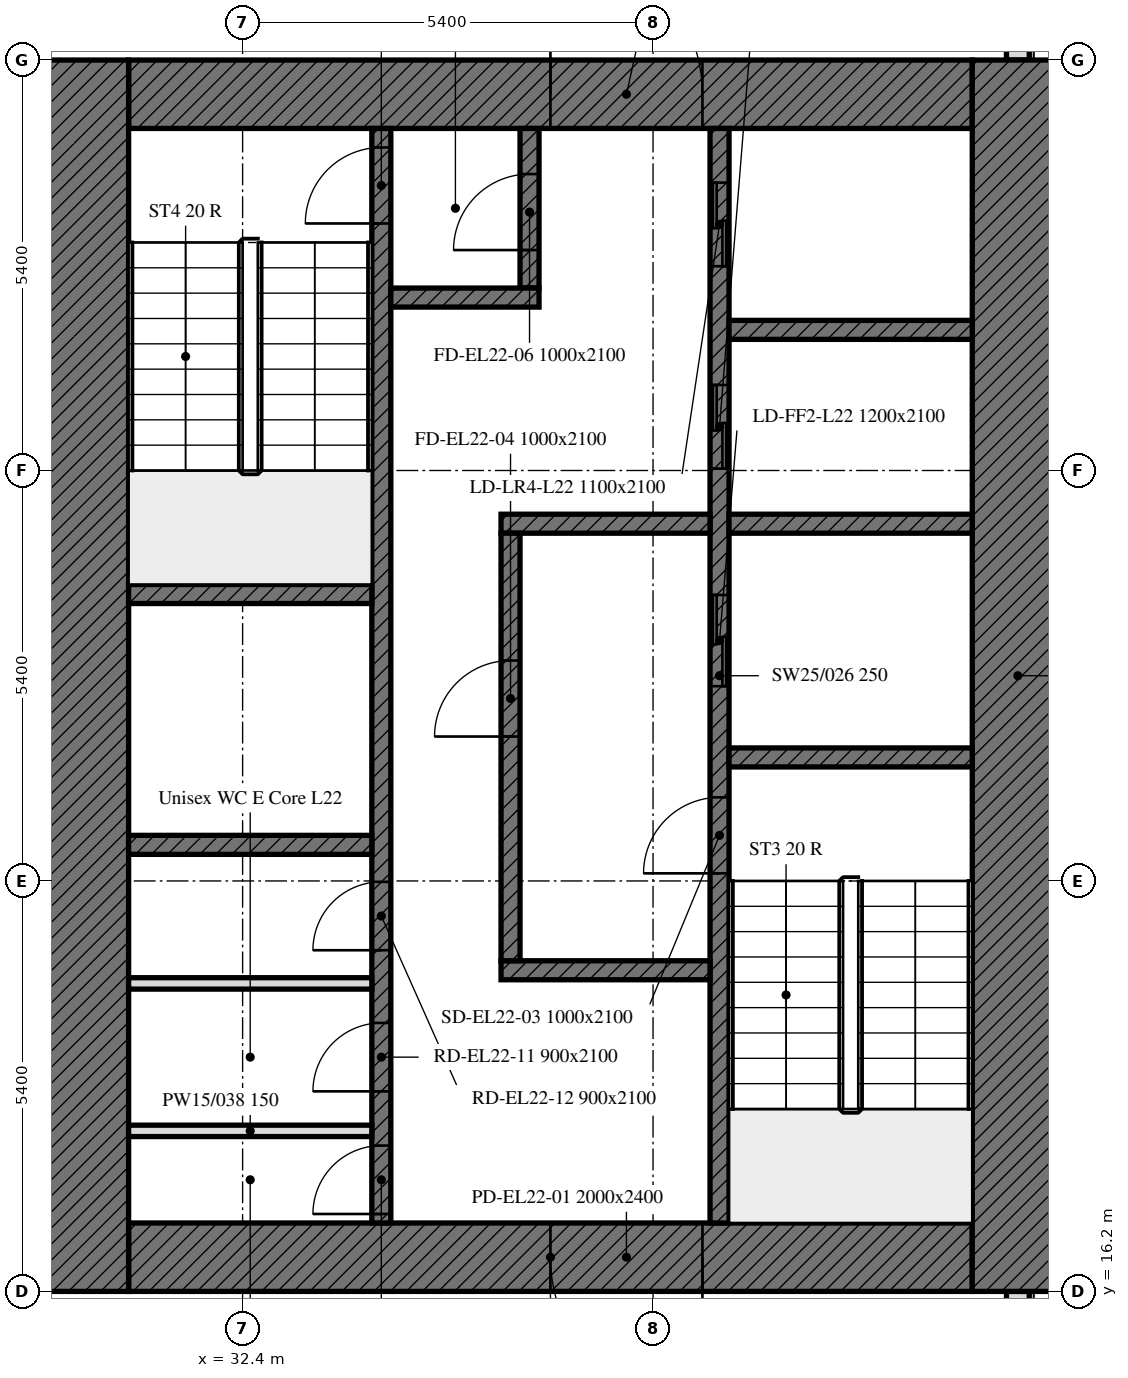
"""IFC4 building model, lengths in metres.
Left out: names, types, materials, properties, quantities, classifications, styles, units other than length and angle.
Written with IfcOpenShell. Run it as: python <this file> out.ifc"""

import sys

from ifc_helpers import new_model, si_unit, direction, frame, frame_2d, origin, place, context, subcontext, project, spatial, rectangle, extrude, element, fill, save


model = new_model("IFC4")
c1 = context("Model", 3, precision=1e-05, world=origin(), true_north=direction((0.0, 1.0)))
c2 = subcontext(c1, "Body", "Model", "MODEL_VIEW")
j1 = project(units=[si_unit("LENGTHUNIT", "METRE"), si_unit("PLANEANGLEUNIT", "RADIAN")], contexts=[c1])
p1 = place(None, origin())
s1 = spatial("IfcSite", under=j1, at=p1, CompositionType="ELEMENT")
p2 = place(p1, origin())
s2 = spatial("IfcBuilding", under=s1, at=p2, CompositionType="ELEMENT")
p3 = place(p2, frame((0.0, 0.0, 95.4)))
s3 = spatial("IfcBuildingStorey", under=s2, at=p3, CompositionType="ELEMENT", Elevation=95.4)
p4 = place(p3, frame((42.6, 10.986, 0.0), z_axis=(0.0, 0.0, 1.0), x_axis=(0.0, 1.0, 0.0)))
e1 = element("IfcWall", 1, at=p4, inside=s3, PredefinedType="SOLIDWALL", context=c2, shape_type="SweptSolid", body=[
    extrude(rectangle(XDim=5.214, YDim=0.3, at=frame_2d((2.607, 0.0))), origin(), (0.0, 0.0, 1.0), 3.5),
])
p5 = place(p4, frame((0.714, 0.0, 0.0)))
e2 = element("IfcOpeningElement", 2, at=p5, cuts=e1, PredefinedType="OPENING", context=c2, shape_type="SweptSolid", body=[
    extrude(rectangle(XDim=1.2, YDim=2.4, at=frame_2d((0.6, 1.2))), frame((0.0, 0.16, 0.0), z_axis=(0.0, -1.0, 0.0), x_axis=(1.0, 0.0, 0.0)), (0.0, 0.0, 1.0), 0.32),
])
p6 = place(p3, frame((42.6, 32.4, 0.0), z_axis=(0.0, 0.0, 1.0), x_axis=(0.0, 1.0, 0.0)))
e3 = element("IfcWall", 3, at=p6, inside=s3, PredefinedType="SOLIDWALL", context=c2, shape_type="SweptSolid", body=[
    extrude(rectangle(XDim=10.614, YDim=0.3, at=frame_2d((5.307, 0.0))), origin(), (0.0, 0.0, 1.0), 3.5),
])
p7 = place(p6, frame((3.3, 0.0, 0.0)))
e4 = element("IfcOpeningElement", 4, at=p7, cuts=e3, PredefinedType="OPENING", context=c2, shape_type="SweptSolid", body=[
    extrude(rectangle(XDim=1.2, YDim=2.4, at=frame_2d((0.6, 1.2))), frame((0.0, 0.16, 0.0), z_axis=(0.0, -1.0, 0.0), x_axis=(1.0, 0.0, 0.0)), (0.0, 0.0, 1.0), 0.32),
])
p8 = place(p6, frame((7.2, 0.0, 0.0)))
e5 = element("IfcOpeningElement", 5, at=p8, cuts=e3, PredefinedType="OPENING", context=c2, shape_type="SweptSolid", body=[
    extrude(rectangle(XDim=1.8, YDim=2.4, at=frame_2d((0.9, 1.2))), frame((0.0, 0.16, 0.0), z_axis=(0.0, -1.0, 0.0), x_axis=(1.0, 0.0, 0.0)), (0.0, 0.0, 1.0), 0.32),
])
p9 = place(p3, frame((42.0, 16.65, 0.0), z_axis=(0.0, 0.0, 1.0), x_axis=(-1.0, 0.0, 0.0)))
e6 = element("IfcWall", 6, at=p9, inside=s3, PredefinedType="SOLIDWALL", context=c2, shape_type="SweptSolid", body=[
    extrude(rectangle(XDim=11.1, YDim=0.9, at=frame_2d((5.55, 0.0))), origin(), (0.0, 0.0, 1.0), 3.5),
])
p10 = place(p9, frame((3.55, 0.0, 0.0)))
e7 = element("IfcOpeningElement", 7, at=p10, cuts=e6, PredefinedType="OPENING", context=c2, shape_type="SweptSolid", body=[
    extrude(rectangle(XDim=2.0, YDim=2.4, at=frame_2d((1.0, 1.2))), frame((0.0, 0.45, 0.0), z_axis=(0.0, -1.0, 0.0), x_axis=(1.0, 0.0, 0.0)), (0.0, 0.0, 1.0), 0.9),
])
p11 = place(p3, frame((30.9, 31.95, 0.0), z_axis=(0.0, 0.0, 1.0), x_axis=(1.0, 0.0, 0.0)))
e8 = element("IfcWall", 8, at=p11, inside=s3, PredefinedType="SOLIDWALL", context=c2, shape_type="SweptSolid", body=[
    extrude(rectangle(XDim=11.1, YDim=0.9, at=frame_2d((5.55, 0.0))), origin(), (0.0, 0.0, 1.0), 3.5),
])
p12 = place(p11, frame((5.55, 0.0, 0.0)))
e9 = element("IfcOpeningElement", 9, at=p12, cuts=e8, PredefinedType="OPENING", context=c2, shape_type="SweptSolid", body=[
    extrude(rectangle(XDim=2.0, YDim=2.4, at=frame_2d((1.0, 1.2))), frame((0.0, 0.45, 0.0), z_axis=(0.0, -1.0, 0.0), x_axis=(1.0, 0.0, 0.0)), (0.0, 0.0, 1.0), 0.9),
])
for number, where, z_axis, x_axis in (
    (10, (42.6, 32.4, 0.0), (0.0, 0.0, 1.0), (0.0, -1.0, 0.0)),
    (11, (30.3, 16.2, 0.0), (0.0, 0.0, 1.0), (0.0, 1.0, 0.0)),
):
    element("IfcWall", number, at=place(p3, frame(where, z_axis=z_axis, x_axis=x_axis)), inside=s3, PredefinedType="SOLIDWALL", context=c2, shape_type="SweptSolid", body=[
        extrude(rectangle(XDim=16.2, YDim=1.2, at=frame_2d((8.1, 0.0))), origin(), (0.0, 0.0, 1.0), 3.5),
    ])
p13 = place(p3, frame((38.675, 17.1, 0.0), z_axis=(0.0, 0.0, 1.0), x_axis=(0.0, 1.0, 0.0)))
e12 = element("IfcWall", 12, at=p13, inside=s3, PredefinedType="SOLIDWALL", context=c2, shape_type="SweptSolid", body=[
    extrude(rectangle(XDim=14.4, YDim=0.25, at=frame_2d((7.2, 0.0))), origin(), (0.0, 0.0, 1.0), 3.5),
])
p14 = place(p13, frame((4.6, 0.0, 0.0)))
e13 = element("IfcOpeningElement", 13, at=p14, cuts=e12, PredefinedType="OPENING", context=c2, shape_type="SweptSolid", body=[
    extrude(rectangle(XDim=1.0, YDim=2.1, at=frame_2d((0.5, 1.05))), frame((0.0, 0.125, 0.0), z_axis=(0.0, -1.0, 0.0), x_axis=(1.0, 0.0, 0.0)), (0.0, 0.0, 1.0), 0.25),
])
p15 = place(p13, frame((7.062, 0.0, 0.0)))
e14 = element("IfcOpeningElement", 14, at=p15, cuts=e12, PredefinedType="OPENING", context=c2, shape_type="SweptSolid", body=[
    extrude(rectangle(XDim=1.2, YDim=2.1, at=frame_2d((0.6, 1.05))), frame((0.0, 0.125, 0.0), z_axis=(0.0, -1.0, 0.0), x_axis=(1.0, 0.0, 0.0)), (0.0, 0.0, 1.0), 0.25),
])
p16 = place(p13, frame((9.925, 0.0, 0.0)))
e15 = element("IfcOpeningElement", 15, at=p16, cuts=e12, PredefinedType="OPENING", context=c2, shape_type="SweptSolid", body=[
    extrude(rectangle(XDim=1.1, YDim=2.1, at=frame_2d((0.55, 1.05))), frame((0.0, 0.125, 0.0), z_axis=(0.0, -1.0, 0.0), x_axis=(1.0, 0.0, 0.0)), (0.0, 0.0, 1.0), 0.25),
])
p17 = place(p13, frame((12.587, 0.0, 0.0)))
e16 = element("IfcOpeningElement", 16, at=p17, cuts=e12, PredefinedType="OPENING", context=c2, shape_type="SweptSolid", body=[
    extrude(rectangle(XDim=1.1, YDim=2.1, at=frame_2d((0.55, 1.05))), frame((0.0, 0.125, 0.0), z_axis=(0.0, -1.0, 0.0), x_axis=(1.0, 0.0, 0.0)), (0.0, 0.0, 1.0), 0.25),
])
p18 = place(p3, frame((34.225, 17.1, 0.0), z_axis=(0.0, 0.0, 1.0), x_axis=(0.0, 1.0, 0.0)))
e17 = element("IfcWall", 17, at=p18, inside=s3, PredefinedType="SOLIDWALL", context=c2, shape_type="SweptSolid", body=[
    extrude(rectangle(XDim=14.4, YDim=0.25, at=frame_2d((7.2, 0.0))), origin(), (0.0, 0.0, 1.0), 3.5),
])
p19 = place(p18, frame((13.15, 0.0, 0.0)))
e18 = element("IfcOpeningElement", 18, at=p19, cuts=e17, PredefinedType="OPENING", context=c2, shape_type="SweptSolid", body=[
    extrude(rectangle(XDim=1.0, YDim=2.1, at=frame_2d((0.5, 1.05))), frame((0.0, 0.125, 0.0), z_axis=(0.0, -1.0, 0.0), x_axis=(1.0, 0.0, 0.0)), (0.0, 0.0, 1.0), 0.25),
])
p20 = place(p18, frame((0.118, 0.0, 0.0)))
e19 = element("IfcOpeningElement", 19, at=p20, cuts=e17, PredefinedType="OPENING", context=c2, shape_type="SweptSolid", body=[
    extrude(rectangle(XDim=0.9, YDim=2.1, at=frame_2d((0.45, 1.05))), frame((0.0, 0.125, 0.0), z_axis=(0.0, -1.0, 0.0), x_axis=(1.0, 0.0, 0.0)), (0.0, 0.0, 1.0), 0.25),
])
p21 = place(p18, frame((1.732, 0.0, 0.0)))
e20 = element("IfcOpeningElement", 20, at=p21, cuts=e17, PredefinedType="OPENING", context=c2, shape_type="SweptSolid", body=[
    extrude(rectangle(XDim=0.9, YDim=2.1, at=frame_2d((0.45, 1.05))), frame((0.0, 0.125, 0.0), z_axis=(0.0, -1.0, 0.0), x_axis=(1.0, 0.0, 0.0)), (0.0, 0.0, 1.0), 0.25),
])
p22 = place(p18, frame((3.588, 0.0, 0.0)))
e21 = element("IfcOpeningElement", 21, at=p22, cuts=e17, PredefinedType="OPENING", context=c2, shape_type="SweptSolid", body=[
    extrude(rectangle(XDim=0.9, YDim=2.1, at=frame_2d((0.45, 1.05))), frame((0.0, 0.125, 0.0), z_axis=(0.0, -1.0, 0.0), x_axis=(1.0, 0.0, 0.0)), (0.0, 0.0, 1.0), 0.25),
])
p23 = place(p3, frame((38.8, 23.225, 0.0), z_axis=(0.0, 0.0, 1.0), x_axis=(1.0, 0.0, 0.0)))
e22 = element("IfcWall", 22, at=p23, inside=s3, PredefinedType="SOLIDWALL", context=c2, shape_type="SweptSolid", body=[
    extrude(rectangle(XDim=3.2, YDim=0.25, at=frame_2d((1.6, 0.0))), origin(), (0.0, 0.0, 1.0), 3.5),
])
for number, where, z_axis, x_axis in (
    (23, (30.9, 25.375, 0.0), (0.0, 0.0, 1.0), (1.0, 0.0, 0.0)),
    (24, (30.9, 22.075, 0.0), (0.0, 0.0, 1.0), (1.0, 0.0, 0.0)),
):
    element("IfcWall", number, at=place(p3, frame(where, z_axis=z_axis, x_axis=x_axis)), inside=s3, PredefinedType="SOLIDWALL", context=c2, shape_type="SweptSolid", body=[
        extrude(rectangle(XDim=3.2, YDim=0.25, at=frame_2d((1.6, 0.0))), origin(), (0.0, 0.0, 1.0), 3.5),
    ])
p24 = place(p3, frame((38.8, 26.3, 0.0), z_axis=(0.0, 0.0, 1.0), x_axis=(1.0, 0.0, 0.0)))
e25 = element("IfcWall", 25, at=p24, inside=s3, PredefinedType="SOLIDWALL", context=c2, shape_type="SweptSolid", body=[
    extrude(rectangle(XDim=3.2, YDim=0.25, at=frame_2d((1.6, 0.0))), origin(), (0.0, 0.0, 1.0), 3.5),
])
for number, where, z_axis, x_axis in (
    (26, (35.8, 26.3, 0.0), (0.0, 0.0, 1.0), (1.0, 0.0, 0.0)),
    (27, (35.8, 20.425, 0.0), (0.0, 0.0, 1.0), (1.0, 0.0, 0.0)),
):
    element("IfcWall", number, at=place(p3, frame(where, z_axis=z_axis, x_axis=x_axis)), inside=s3, PredefinedType="SOLIDWALL", context=c2, shape_type="SweptSolid", body=[
        extrude(rectangle(XDim=2.75, YDim=0.25, at=frame_2d((1.375, 0.0))), origin(), (0.0, 0.0, 1.0), 3.5),
    ])
p25 = place(p3, frame((36.175, 29.4, 0.0), z_axis=(0.0, 0.0, 1.0), x_axis=(0.0, 1.0, 0.0)))
e28 = element("IfcWall", 28, at=p25, inside=s3, PredefinedType="SOLIDWALL", context=c2, shape_type="SweptSolid", body=[
    extrude(rectangle(XDim=2.1, YDim=0.25, at=frame_2d((1.05, 0.0))), origin(), (0.0, 0.0, 1.0), 3.5),
])
p26 = place(p25, frame((0.5, 0.0, 0.0)))
e29 = element("IfcOpeningElement", 29, at=p26, cuts=e28, PredefinedType="OPENING", context=c2, shape_type="SweptSolid", body=[
    extrude(rectangle(XDim=1.0, YDim=2.1, at=frame_2d((0.5, 1.05))), frame((0.0, 0.125, 0.0), z_axis=(0.0, -1.0, 0.0), x_axis=(1.0, 0.0, 0.0)), (0.0, 0.0, 1.0), 0.25),
])
p27 = place(p3, frame((34.35, 29.275, 0.0), z_axis=(0.0, 0.0, 1.0), x_axis=(1.0, 0.0, 0.0)))
e30 = element("IfcWall", 30, at=p27, inside=s3, PredefinedType="SOLIDWALL", context=c2, shape_type="SweptSolid", body=[
    extrude(rectangle(XDim=1.95, YDim=0.25, at=frame_2d((0.975, 0.0))), origin(), (0.0, 0.0, 1.0), 3.5),
])
p28 = place(p3, frame((35.925, 20.55, 0.0), z_axis=(0.0, 0.0, 1.0), x_axis=(0.0, 1.0, 0.0)))
e31 = element("IfcWall", 31, at=p28, inside=s3, PredefinedType="SOLIDWALL", context=c2, shape_type="SweptSolid", body=[
    extrude(rectangle(XDim=5.625, YDim=0.25, at=frame_2d((2.812, 0.0))), origin(), (0.0, 0.0, 1.0), 3.5),
])
p29 = place(p28, frame((2.95, 0.0, 0.0)))
e32 = element("IfcOpeningElement", 32, at=p29, cuts=e31, PredefinedType="OPENING", context=c2, shape_type="SweptSolid", body=[
    extrude(rectangle(XDim=1.0, YDim=2.1, at=frame_2d((0.5, 1.05))), frame((0.0, 0.125, 0.0), z_axis=(0.0, -1.0, 0.0), x_axis=(1.0, 0.0, 0.0)), (0.0, 0.0, 1.0), 0.25),
])
p30 = place(p3, frame((38.8, 28.85, 0.0), z_axis=(0.0, 0.0, 1.0), x_axis=(1.0, 0.0, 0.0)))
e33 = element("IfcWall", 33, at=p30, inside=s3, PredefinedType="SOLIDWALL", context=c2, shape_type="SweptSolid", body=[
    extrude(rectangle(XDim=3.2, YDim=0.25, at=frame_2d((1.6, 0.0))), origin(), (0.0, 0.0, 1.0), 3.5),
])
for number, where, z_axis, x_axis in (
    (34, (30.9, 18.312, 0.0), (0.0, 0.0, 1.0), (1.0, 0.0, 0.0)),
    (35, (30.9, 20.252, 0.0), (0.0, 0.0, 1.0), (1.0, 0.0, 0.0)),
):
    element("IfcWall", number, at=place(p3, frame(where, z_axis=z_axis, x_axis=x_axis)), inside=s3, PredefinedType="PARTITIONING", context=c2, shape_type="SweptSolid", body=[
        extrude(rectangle(XDim=3.2, YDim=0.15, at=frame_2d((1.6, 0.0))), origin(), (0.0, 0.0, 1.0), 3.5),
    ])
p31 = place(p10, origin())
e36 = element("IfcDoor", 36, at=p31, inside=s3, OperationType="DOUBLE_DOOR_SINGLE_SWING", PredefinedType="DOOR", context=c2, shape_type="SweptSolid", body=[
    extrude(rectangle(XDim=2.0, YDim=2.4, at=frame_2d((1.0, 1.2))), frame((0.0, 0.025, 0.0), z_axis=(0.0, -1.0, 0.0), x_axis=(1.0, 0.0, 0.0)), (0.0, 0.0, 1.0), 0.05),
])
fill(e7, e36)
p32 = place(p12, origin())
e37 = element("IfcDoor", 37, at=p32, inside=s3, OperationType="DOUBLE_DOOR_SINGLE_SWING", PredefinedType="DOOR", context=c2, shape_type="SweptSolid", body=[
    extrude(rectangle(XDim=2.0, YDim=2.4, at=frame_2d((1.0, 1.2))), frame((0.0, 0.025, 0.0), z_axis=(0.0, -1.0, 0.0), x_axis=(1.0, 0.0, 0.0)), (0.0, 0.0, 1.0), 0.05),
])
fill(e9, e37)
p33 = place(p14, origin())
e38 = element("IfcDoor", 38, at=p33, inside=s3, OperationType="SINGLE_SWING_LEFT", PredefinedType="DOOR", context=c2, shape_type="SweptSolid", body=[
    extrude(rectangle(XDim=1.0, YDim=2.1, at=frame_2d((0.5, 1.05))), frame((0.0, 0.025, 0.0), z_axis=(0.0, -1.0, 0.0), x_axis=(1.0, 0.0, 0.0)), (0.0, 0.0, 1.0), 0.05),
])
fill(e13, e38)
p34 = place(p29, origin())
e39 = element("IfcDoor", 39, at=p34, inside=s3, OperationType="SINGLE_SWING_LEFT", PredefinedType="DOOR", context=c2, shape_type="SweptSolid", body=[
    extrude(rectangle(XDim=1.0, YDim=2.1, at=frame_2d((0.5, 1.05))), frame((0.0, 0.025, 0.0), z_axis=(0.0, -1.0, 0.0), x_axis=(1.0, 0.0, 0.0)), (0.0, 0.0, 1.0), 0.05),
])
fill(e32, e39)
p35 = place(p19, origin())
e40 = element("IfcDoor", 40, at=p35, inside=s3, OperationType="SINGLE_SWING_LEFT", PredefinedType="DOOR", context=c2, shape_type="SweptSolid", body=[
    extrude(rectangle(XDim=1.0, YDim=2.1, at=frame_2d((0.5, 1.05))), frame((0.0, 0.025, 0.0), z_axis=(0.0, -1.0, 0.0), x_axis=(1.0, 0.0, 0.0)), (0.0, 0.0, 1.0), 0.05),
])
fill(e18, e40)
p36 = place(p26, origin())
e41 = element("IfcDoor", 41, at=p36, inside=s3, OperationType="SINGLE_SWING_LEFT", PredefinedType="DOOR", context=c2, shape_type="SweptSolid", body=[
    extrude(rectangle(XDim=1.0, YDim=2.1, at=frame_2d((0.5, 1.05))), frame((0.0, 0.025, 0.0), z_axis=(0.0, -1.0, 0.0), x_axis=(1.0, 0.0, 0.0)), (0.0, 0.0, 1.0), 0.05),
])
fill(e29, e41)
p37 = place(p15, origin())
e42 = element("IfcDoor", 42, at=p37, inside=s3, OperationType="DOUBLE_DOOR_SLIDING", PredefinedType="DOOR", context=c2, shape_type="SweptSolid", body=[
    extrude(rectangle(XDim=1.2, YDim=2.1, at=frame_2d((0.6, 1.05))), frame((0.0, 0.025, 0.0), z_axis=(0.0, -1.0, 0.0), x_axis=(1.0, 0.0, 0.0)), (0.0, 0.0, 1.0), 0.05),
])
fill(e14, e42)
p38 = place(p16, origin())
e43 = element("IfcDoor", 43, at=p38, inside=s3, OperationType="DOUBLE_DOOR_SLIDING", PredefinedType="DOOR", context=c2, shape_type="SweptSolid", body=[
    extrude(rectangle(XDim=1.1, YDim=2.1, at=frame_2d((0.55, 1.05))), frame((0.0, 0.025, 0.0), z_axis=(0.0, -1.0, 0.0), x_axis=(1.0, 0.0, 0.0)), (0.0, 0.0, 1.0), 0.05),
])
fill(e15, e43)
p39 = place(p17, origin())
e44 = element("IfcDoor", 44, at=p39, inside=s3, OperationType="DOUBLE_DOOR_SLIDING", PredefinedType="DOOR", context=c2, shape_type="SweptSolid", body=[
    extrude(rectangle(XDim=1.1, YDim=2.1, at=frame_2d((0.55, 1.05))), frame((0.0, 0.025, 0.0), z_axis=(0.0, -1.0, 0.0), x_axis=(1.0, 0.0, 0.0)), (0.0, 0.0, 1.0), 0.05),
])
fill(e16, e44)
p40 = place(p20, origin())
e45 = element("IfcDoor", 45, at=p40, inside=s3, OperationType="SINGLE_SWING_LEFT", PredefinedType="DOOR", context=c2, shape_type="SweptSolid", body=[
    extrude(rectangle(XDim=0.9, YDim=2.1, at=frame_2d((0.45, 1.05))), frame((0.0, 0.025, 0.0), z_axis=(0.0, -1.0, 0.0), x_axis=(1.0, 0.0, 0.0)), (0.0, 0.0, 1.0), 0.05),
])
fill(e19, e45)
p41 = place(p21, origin())
e46 = element("IfcDoor", 46, at=p41, inside=s3, OperationType="SINGLE_SWING_LEFT", PredefinedType="DOOR", context=c2, shape_type="SweptSolid", body=[
    extrude(rectangle(XDim=0.9, YDim=2.1, at=frame_2d((0.45, 1.05))), frame((0.0, 0.025, 0.0), z_axis=(0.0, -1.0, 0.0), x_axis=(1.0, 0.0, 0.0)), (0.0, 0.0, 1.0), 0.05),
])
fill(e20, e46)
p42 = place(p22, origin())
e47 = element("IfcDoor", 47, at=p42, inside=s3, OperationType="SINGLE_SWING_LEFT", PredefinedType="DOOR", context=c2, shape_type="SweptSolid", body=[
    extrude(rectangle(XDim=0.9, YDim=2.1, at=frame_2d((0.45, 1.05))), frame((0.0, 0.025, 0.0), z_axis=(0.0, -1.0, 0.0), x_axis=(1.0, 0.0, 0.0)), (0.0, 0.0, 1.0), 0.05),
])
fill(e21, e47)
save(model, sys.argv[1])
